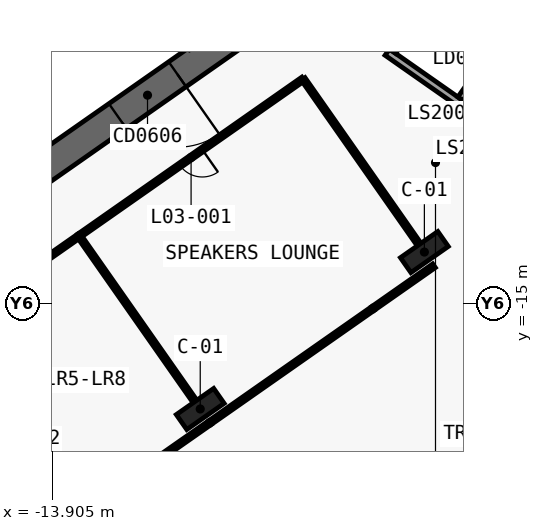
"""IFC4 building model, lengths in metres.
Left out: names, types, materials, properties, quantities, classifications, styles, units other than length and angle.
Written with IfcOpenShell. Run it as: python <this file> out.ifc"""

import sys

from ifc_helpers import new_model, si_unit, direction, frame, frame_2d, origin, origin_2d, place, context, subcontext, project, spatial, polyline, rectangle, outline, extrude, element, fill, save


model = new_model("IFC4")
c1 = context("Model", 3, precision=1e-05, world=origin(), true_north=direction((0.0, 1.0)))
c2 = subcontext(c1, "Body", "Model", "MODEL_VIEW")
j1 = project(units=[si_unit("LENGTHUNIT", "METRE"), si_unit("PLANEANGLEUNIT", "RADIAN")], contexts=[c1])
p1 = place(None, origin())
s1 = spatial("IfcSite", under=j1, at=p1, CompositionType="ELEMENT")
p2 = place(p1, origin())
s2 = spatial("IfcBuilding", under=s1, at=p2, CompositionType="ELEMENT")
p3 = place(p2, frame((0.0, 0.0, 26.0)))
s3 = spatial("IfcBuildingStorey", under=s2, at=p3, CompositionType="ELEMENT", Elevation=26.0)
p4 = place(p3, frame((0.037, 11.867, 0.0), z_axis=(0.0, 0.0, 1.0), x_axis=(-0.819155306259, -0.573571777746, 0.0)))
e1 = element("IfcWall", 1, at=p4, inside=s3, PredefinedType="SHEAR", context=c2, shape_type="SweptSolid", body=[
    extrude(outline(polyline([(33.837, 0.5), (0.7, 0.5), (0.0, -0.5), (33.837, -0.5), (33.837, 0.5)])), origin(), (0.0, 0.0, 1.0), 6.0),
])
p5 = place(p3, frame((0.037, -0.585, 0.0), z_axis=(0.0, 0.0, 1.0), x_axis=(-0.819157152511, -0.573569140985, 0.0)))
e2 = element("IfcWall", 2, at=p5, inside=s3, PredefinedType="SHEAR", context=c2, shape_type="SweptSolid", body=[
    extrude(outline(polyline([(26.695, 0.5), (0.7, 0.5), (0.0, -0.5), (26.695, -0.5), (26.695, 0.5)])), origin(), (0.0, 0.0, 1.0), 6.0),
])
p6 = place(p5, frame((2.995, 0.0, 0.0)))
e3 = element("IfcOpeningElement", 3, at=p6, cuts=e2, PredefinedType="OPENING", context=c2, shape_type="SweptSolid", body=[
    extrude(rectangle(XDim=2.4, YDim=2.1, at=frame_2d((1.2, 1.05))), frame((0.0, 0.51, 0.0), z_axis=(0.0, -1.0, 0.0), x_axis=(1.0, 0.0, 0.0)), (0.0, 0.0, 1.0), 1.02),
])
p7 = place(p5, frame((11.995, 0.0, 0.0)))
e4 = element("IfcOpeningElement", 4, at=p7, cuts=e2, PredefinedType="OPENING", context=c2, shape_type="SweptSolid", body=[
    extrude(rectangle(XDim=2.4, YDim=2.1, at=frame_2d((1.2, 1.05))), frame((0.0, 0.51, 0.0), z_axis=(0.0, -1.0, 0.0), x_axis=(1.0, 0.0, 0.0)), (0.0, 0.0, 1.0), 1.02),
])
p8 = place(p3, frame((-2.638, 3.768, 0.0), z_axis=(0.0, 0.0, 1.0), x_axis=(-0.819148977158, -0.573580816643, 0.0)))
e5 = element("IfcWall", 5, at=p8, inside=s3, PredefinedType="SHEAR", context=c2, shape_type="SweptSolid", body=[
    extrude(outline(polyline([(26.0, 0.25), (0.0, 0.25), (0.0, -0.25), (26.0, -0.25), (26.0, 0.25)])), origin(), (0.0, 0.0, 1.0), 6.0),
])
p9 = place(p8, frame((1.169, 0.0, 0.0)))
e6 = element("IfcOpeningElement", 6, at=p9, cuts=e5, PredefinedType="OPENING", context=c2, shape_type="SweptSolid", body=[
    extrude(rectangle(XDim=1.1, YDim=2.1, at=frame_2d((0.55, 1.05))), frame((0.0, 0.26, 0.0), z_axis=(0.0, -1.0, 0.0), x_axis=(1.0, 0.0, 0.0)), (0.0, 0.0, 1.0), 0.52),
])
p10 = place(p8, frame((3.206, 0.0, 0.0)))
e7 = element("IfcOpeningElement", 7, at=p10, cuts=e5, PredefinedType="OPENING", context=c2, shape_type="SweptSolid", body=[
    extrude(rectangle(XDim=1.1, YDim=2.1, at=frame_2d((0.55, 1.05))), frame((0.0, 0.26, 0.0), z_axis=(0.0, -1.0, 0.0), x_axis=(1.0, 0.0, 0.0)), (0.0, 0.0, 1.0), 0.52),
])
p11 = place(p8, frame((5.244, 0.0, 0.0)))
e8 = element("IfcOpeningElement", 8, at=p11, cuts=e5, PredefinedType="OPENING", context=c2, shape_type="SweptSolid", body=[
    extrude(rectangle(XDim=1.1, YDim=2.1, at=frame_2d((0.55, 1.05))), frame((0.0, 0.26, 0.0), z_axis=(0.0, -1.0, 0.0), x_axis=(1.0, 0.0, 0.0)), (0.0, 0.0, 1.0), 0.52),
])
p12 = place(p8, frame((7.281, 0.0, 0.0)))
e9 = element("IfcOpeningElement", 9, at=p12, cuts=e5, PredefinedType="OPENING", context=c2, shape_type="SweptSolid", body=[
    extrude(rectangle(XDim=1.1, YDim=2.1, at=frame_2d((0.55, 1.05))), frame((0.0, 0.26, 0.0), z_axis=(0.0, -1.0, 0.0), x_axis=(1.0, 0.0, 0.0)), (0.0, 0.0, 1.0), 0.52),
])
p13 = place(p8, frame((9.688, 0.0, 0.0)))
e10 = element("IfcOpeningElement", 10, at=p13, cuts=e5, PredefinedType="OPENING", context=c2, shape_type="SweptSolid", body=[
    extrude(rectangle(XDim=1.1, YDim=2.1, at=frame_2d((0.55, 1.05))), frame((0.0, 0.26, 0.0), z_axis=(0.0, -1.0, 0.0), x_axis=(1.0, 0.0, 0.0)), (0.0, 0.0, 1.0), 0.52),
])
p14 = place(p8, frame((11.863, 0.0, 0.0)))
e11 = element("IfcOpeningElement", 11, at=p14, cuts=e5, PredefinedType="OPENING", context=c2, shape_type="SweptSolid", body=[
    extrude(rectangle(XDim=1.1, YDim=2.1, at=frame_2d((0.55, 1.05))), frame((0.0, 0.26, 0.0), z_axis=(0.0, -1.0, 0.0), x_axis=(1.0, 0.0, 0.0)), (0.0, 0.0, 1.0), 0.52),
])
p15 = place(p8, frame((14.038, 0.0, 0.0)))
e12 = element("IfcOpeningElement", 12, at=p15, cuts=e5, PredefinedType="OPENING", context=c2, shape_type="SweptSolid", body=[
    extrude(rectangle(XDim=1.1, YDim=2.1, at=frame_2d((0.55, 1.05))), frame((0.0, 0.26, 0.0), z_axis=(0.0, -1.0, 0.0), x_axis=(1.0, 0.0, 0.0)), (0.0, 0.0, 1.0), 0.52),
])
p16 = place(p8, frame((16.212, 0.0, 0.0)))
e13 = element("IfcOpeningElement", 13, at=p16, cuts=e5, PredefinedType="OPENING", context=c2, shape_type="SweptSolid", body=[
    extrude(rectangle(XDim=1.1, YDim=2.1, at=frame_2d((0.55, 1.05))), frame((0.0, 0.26, 0.0), z_axis=(0.0, -1.0, 0.0), x_axis=(1.0, 0.0, 0.0)), (0.0, 0.0, 1.0), 0.52),
])
for number, where, z_axis, x_axis in (
    (14, (-1.665, -13.313, 0.0), (0.0, 0.0, 1.0), (-0.819, -0.574, 0.0)),
    (15, (-9.038, -18.475, 0.0), (0.0, 0.0, 1.0), (-0.819, -0.574, 0.0)),
):
    element("IfcColumn", number, at=place(p3, frame(where, z_axis=z_axis, x_axis=x_axis)), inside=s3, PredefinedType="COLUMN", context=c2, shape_type="SweptSolid", body=[
        extrude(rectangle(XDim=1.5, YDim=0.6, at=origin_2d()), origin(), (0.0, 0.0, 1.0), 6.0),
    ])
p17 = place(p3, frame((-2.887, -6.738, 0.0), z_axis=(0.0, 0.0, 1.0), x_axis=(0.819150280716, -0.573578954985, 0.0)))
e16 = element("IfcWall", 16, at=p17, inside=s3, PredefinedType="SOLIDWALL", context=c2, shape_type="SweptSolid", body=[
    extrude(rectangle(XDim=11.1, YDim=0.25, at=frame_2d((5.55, 0.0))), origin(), (0.0, 0.0, 1.0), 6.0),
])
p18 = place(p3, frame((-1.481, -4.731, 0.0), z_axis=(0.0, 0.0, 1.0), x_axis=(0.819150280716, -0.573578954985, 0.0)))
e17 = element("IfcWall", 17, at=p18, inside=s3, PredefinedType="SOLIDWALL", context=c2, shape_type="SweptSolid", body=[
    extrude(rectangle(XDim=11.1, YDim=0.25, at=frame_2d((5.55, 0.0))), origin(), (0.0, 0.0, 1.0), 6.0),
])
p19 = place(p18, frame((0.8, 0.0, 0.0)))
e18 = element("IfcOpeningElement", 18, at=p19, cuts=e17, PredefinedType="OPENING", context=c2, shape_type="SweptSolid", body=[
    extrude(rectangle(XDim=1.4, YDim=2.1, at=frame_2d((0.7, 1.05))), frame((0.0, 0.135, 0.0), z_axis=(0.0, -1.0, 0.0), x_axis=(1.0, 0.0, 0.0)), (0.0, 0.0, 1.0), 0.27),
])
p20 = place(p18, frame((3.5, 0.0, 0.0)))
e19 = element("IfcOpeningElement", 19, at=p20, cuts=e17, PredefinedType="OPENING", context=c2, shape_type="SweptSolid", body=[
    extrude(rectangle(XDim=1.4, YDim=2.1, at=frame_2d((0.7, 1.05))), frame((0.0, 0.135, 0.0), z_axis=(0.0, -1.0, 0.0), x_axis=(1.0, 0.0, 0.0)), (0.0, 0.0, 1.0), 0.27),
])
p21 = place(p18, frame((6.2, 0.0, 0.0)))
e20 = element("IfcOpeningElement", 20, at=p21, cuts=e17, PredefinedType="OPENING", context=c2, shape_type="SweptSolid", body=[
    extrude(rectangle(XDim=1.4, YDim=2.1, at=frame_2d((0.7, 1.05))), frame((0.0, 0.135, 0.0), z_axis=(0.0, -1.0, 0.0), x_axis=(1.0, 0.0, 0.0)), (0.0, 0.0, 1.0), 0.27),
])
p22 = place(p18, frame((8.9, 0.0, 0.0)))
e21 = element("IfcOpeningElement", 21, at=p22, cuts=e17, PredefinedType="OPENING", context=c2, shape_type="SweptSolid", body=[
    extrude(rectangle(XDim=1.4, YDim=2.1, at=frame_2d((0.7, 1.05))), frame((0.0, 0.135, 0.0), z_axis=(0.0, -1.0, 0.0), x_axis=(1.0, 0.0, 0.0)), (0.0, 0.0, 1.0), 0.27),
])
p23 = place(p3, frame((-2.713, -6.707, 0.0), z_axis=(0.0, 0.0, 1.0), x_axis=(0.573581496053, 0.819148501424, 0.0)))
e22 = element("IfcWall", 22, at=p23, inside=s3, PredefinedType="SOLIDWALL", context=c2, shape_type="SweptSolid", body=[
    extrude(rectangle(XDim=2.2, YDim=0.25, at=frame_2d((1.1, 0.0))), origin(), (0.0, 0.0, 1.0), 6.0),
])
p24 = place(p3, frame((-0.48, -8.27, 0.0), z_axis=(0.0, 0.0, 1.0), x_axis=(0.573633636671, 0.819111989218, 0.0)))
e23 = element("IfcWall", 23, at=p24, inside=s3, PredefinedType="SOLIDWALL", context=c2, shape_type="SweptSolid", body=[
    extrude(rectangle(XDim=2.2, YDim=0.2, at=frame_2d((1.1, 0.0))), origin(), (0.0, 0.0, 1.0), 6.0),
])
p25 = place(p3, frame((-5.652, -7.62, 0.0), z_axis=(0.0, 0.0, 1.0), x_axis=(-0.81915291695, -0.57357519006, 0.0)))
e24 = element("IfcWall", 24, at=p25, inside=s3, PredefinedType="PARTITIONING", context=c2, shape_type="SweptSolid", body=[
    extrude(rectangle(XDim=9.002, YDim=0.15, at=frame_2d((4.501, 0.0))), origin(), (0.0, 0.0, 1.0), 4.18),
])
p26 = place(p25, frame((4.051, 0.0, 0.0)))
e25 = element("IfcOpeningElement", 25, at=p26, cuts=e24, PredefinedType="OPENING", context=c2, shape_type="SweptSolid", body=[
    extrude(rectangle(XDim=0.9, YDim=2.1, at=frame_2d((0.45, 1.05))), frame((0.0, 0.085, 0.0), z_axis=(0.0, -1.0, 0.0), x_axis=(1.0, 0.0, 0.0)), (0.0, 0.0, 1.0), 0.17),
])
p27 = place(p3, frame((-13.022, -12.781, 0.0), z_axis=(0.0, 0.0, 1.0), x_axis=(-0.819154688631, -0.57357265982, 0.0)))
e26 = element("IfcWall", 26, at=p27, inside=s3, PredefinedType="PARTITIONING", context=c2, shape_type="SweptSolid", body=[
    extrude(rectangle(XDim=30.002, YDim=0.15, at=frame_2d((15.001, 0.0))), origin(), (0.0, 0.0, 1.0), 4.18),
])
p28 = place(p27, frame((14.551, 0.0, 0.0)))
e27 = element("IfcOpeningElement", 27, at=p28, cuts=e26, PredefinedType="OPENING", context=c2, shape_type="SweptSolid", body=[
    extrude(rectangle(XDim=0.9, YDim=2.1, at=frame_2d((0.45, 1.05))), frame((0.0, 0.085, 0.0), z_axis=(0.0, -1.0, 0.0), x_axis=(1.0, 0.0, 0.0)), (0.0, 0.0, 1.0), 0.17),
])
p29 = place(p3, frame((-8.723, -18.927, 0.0), z_axis=(0.0, 0.0, 1.0), x_axis=(0.81913387212, 0.573602388024, 0.0)))
e28 = element("IfcWall", 28, at=p29, inside=s3, PredefinedType="PARTITIONING", context=c2, shape_type="SweptSolid", body=[
    extrude(rectangle(XDim=6.552, YDim=0.15, at=frame_2d((3.276, 0.0))), origin(), (0.0, 0.0, 1.0), 5.6),
])
p30 = place(p3, frame((-30.839, -34.413, 0.0), z_axis=(0.0, 0.0, 1.0), x_axis=(0.819150779762, 0.573578242279, 0.0)))
e29 = element("IfcWall", 29, at=p30, inside=s3, PredefinedType="PARTITIONING", context=c2, shape_type="SweptSolid", body=[
    extrude(rectangle(XDim=27.002, YDim=0.15, at=frame_2d((13.501, 0.0))), origin(), (0.0, 0.0, 1.0), 4.58),
])
p31 = place(p3, frame((-3.355, -15.169, 0.0), z_axis=(0.0, 0.0, 1.0), x_axis=(0.819157023945, 0.573569324599, 0.0)))
e30 = element("IfcWall", 30, at=p31, inside=s3, PredefinedType="PARTITIONING", context=c2, shape_type="SweptSolid", body=[
    extrude(rectangle(XDim=2.45, YDim=0.15, at=frame_2d((1.225, 0.0))), origin(), (0.0, 0.0, 1.0), 5.6),
])
p32 = place(p3, frame((-1.849, -13.051, 0.0), z_axis=(0.0, 0.0, 1.0), x_axis=(-0.573575988258, 0.819152358047, 0.0)))
e31 = element("IfcWall", 31, at=p32, inside=s3, PredefinedType="PARTITIONING", context=c2, shape_type="SweptSolid", body=[
    extrude(rectangle(XDim=6.632, YDim=0.15, at=frame_2d((3.316, 0.0))), origin(), (0.0, 0.0, 1.0), 4.18),
])
p33 = place(p3, frame((-9.221, -18.213, 0.0), z_axis=(0.0, 0.0, 1.0), x_axis=(-0.573556251799, 0.819166177294, 0.0)))
e32 = element("IfcWall", 32, at=p33, inside=s3, PredefinedType="PARTITIONING", context=c2, shape_type="SweptSolid", body=[
    extrude(rectangle(XDim=6.63, YDim=0.15, at=frame_2d((3.315, 0.0))), origin(), (0.0, 0.0, 1.0), 4.18),
])
p34 = place(p7, origin())
e33 = element("IfcDoor", 33, at=p34, inside=s3, OperationType="DOUBLE_DOOR_SINGLE_SWING", PredefinedType="DOOR", context=c2, shape_type="SweptSolid", body=[
    extrude(rectangle(XDim=2.4, YDim=2.1, at=frame_2d((1.2, 1.05))), frame((0.0, 0.025, 0.0), z_axis=(0.0, -1.0, 0.0), x_axis=(1.0, 0.0, 0.0)), (0.0, 0.0, 1.0), 0.05),
])
fill(e4, e33)
p35 = place(p26, origin())
e34 = element("IfcDoor", 34, at=p35, inside=s3, OperationType="SINGLE_SWING_RIGHT", PredefinedType="DOOR", context=c2, shape_type="SweptSolid", body=[
    extrude(rectangle(XDim=0.9, YDim=2.1, at=frame_2d((0.45, 1.05))), frame((0.0, 0.025, 0.0), z_axis=(0.0, -1.0, 0.0), x_axis=(1.0, 0.0, 0.0)), (0.0, 0.0, 1.0), 0.05),
])
fill(e25, e34)
save(model, sys.argv[1])
